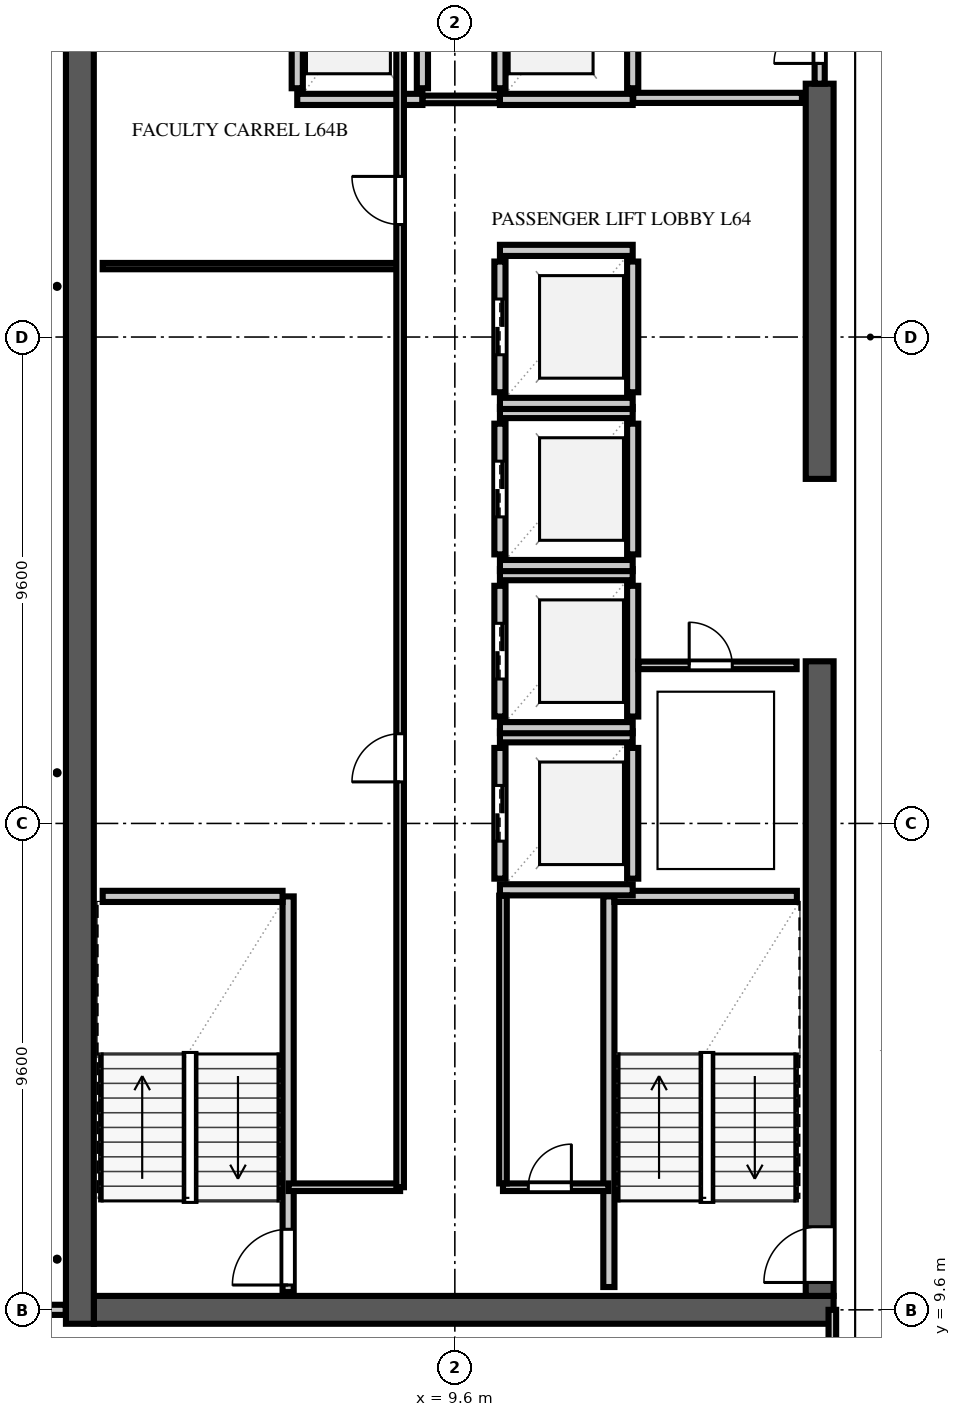
"""IFC4 building model, lengths in metres.
Left out: names, types, materials, properties, quantities, classifications, styles, units other than length and angle.
Written with IfcOpenShell. Run it as: python <this file> out.ifc"""

import sys

from ifc_helpers import new_model, si_unit, direction, frame, frame_2d, origin, place, context, subcontext, project, spatial, rectangle, extrude, element, fill, save


model = new_model("IFC4")
c1 = context("Model", 3, precision=1e-05, world=origin(), true_north=direction((0.0, 1.0)))
c2 = subcontext(c1, "Body", "Model", "MODEL_VIEW")
j1 = project(units=[si_unit("LENGTHUNIT", "METRE"), si_unit("PLANEANGLEUNIT", "RADIAN")], contexts=[c1])
p1 = place(None, origin())
s1 = spatial("IfcSite", under=j1, at=p1, CompositionType="ELEMENT")
p2 = place(p1, origin())
s2 = spatial("IfcBuilding", under=s1, at=p2, CompositionType="ELEMENT")
p3 = place(p2, frame((0.0, 0.0, 252.2)))
s3 = spatial("IfcBuildingStorey", under=s2, at=p3, CompositionType="ELEMENT", Elevation=252.2)
p4 = place(p3, frame((2.475, 9.6, 0.0), z_axis=(0.0, 0.0, 1.0), x_axis=(1.0, 0.0, 0.0)))
e1 = element("IfcWall", 1, at=p4, inside=s3, PredefinedType="SHEAR", context=c2, shape_type="SweptSolid", body=[
    extrude(rectangle(XDim=14.6, YDim=0.55, at=frame_2d((7.3, 0.0))), origin(), (0.0, 0.0, 1.0), 3.48),
])
p5 = place(p3, frame((2.2, 9.325, 0.0), z_axis=(0.0, 0.0, 1.0), x_axis=(0.0, 1.0, 0.0)))
e2 = element("IfcWall", 2, at=p5, inside=s3, PredefinedType="SHEAR", context=c2, shape_type="SweptSolid", body=[
    extrude(rectangle(XDim=38.95, YDim=0.55, at=frame_2d((19.475, 0.0))), origin(), (0.0, 0.0, 1.0), 3.48),
])
p6 = place(p3, frame((16.8, 9.875, 0.0), z_axis=(0.0, 0.0, 1.0), x_axis=(0.0, 1.0, 0.0)))
e3 = element("IfcWall", 3, at=p6, inside=s3, PredefinedType="SHEAR", context=c2, shape_type="SweptSolid", body=[
    extrude(rectangle(XDim=12.525, YDim=0.55, at=frame_2d((6.262, 0.0))), origin(), (0.0, 0.0, 1.0), 3.48),
])
p7 = place(p6, frame((0.265, 0.0, 0.0)))
e4 = element("IfcOpeningElement", 4, at=p7, cuts=e3, PredefinedType="OPENING", context=c2, shape_type="SweptSolid", body=[
    extrude(rectangle(XDim=1.1, YDim=2.2, at=frame_2d((0.55, 1.1))), frame((0.0, 0.287, 0.0), z_axis=(0.0, -1.0, 0.0), x_axis=(1.0, 0.0, 0.0)), (0.0, 0.0, 1.0), 0.574),
])
p8 = place(p3, frame((16.8, 26.0, 0.0), z_axis=(0.0, 0.0, 1.0), x_axis=(0.0, 1.0, 0.0)))
e5 = element("IfcWall", 5, at=p8, inside=s3, PredefinedType="SHEAR", context=c2, shape_type="SweptSolid", body=[
    extrude(rectangle(XDim=7.8, YDim=0.55, at=frame_2d((3.9, 0.0))), origin(), (0.0, 0.0, 1.0), 3.48),
])
p9 = place(p3, frame((6.31, 9.95, 0.0), z_axis=(0.0, 0.0, 1.0), x_axis=(0.0, 1.0, 0.0)))
e6 = element("IfcWall", 6, at=p9, inside=s3, PredefinedType="SOLIDWALL", context=c2, shape_type="SweptSolid", body=[
    extrude(rectangle(XDim=7.81, YDim=0.22, at=frame_2d((3.905, 0.0))), origin(), (0.0, 0.0, 1.0), 3.48),
])
p10 = place(p9, frame((0.14, 0.0, 0.0)))
e7 = element("IfcOpeningElement", 7, at=p10, cuts=e6, PredefinedType="OPENING", context=c2, shape_type="SweptSolid", body=[
    extrude(rectangle(XDim=1.1, YDim=2.2, at=frame_2d((0.55, 1.1))), frame((0.0, 0.122, 0.0), z_axis=(0.0, -1.0, 0.0), x_axis=(1.0, 0.0, 0.0)), (0.0, 0.0, 1.0), 0.244),
])
p11 = place(p3, frame((2.65, 17.76, 0.0), z_axis=(0.0, 0.0, 1.0), x_axis=(1.0, 0.0, 0.0)))
e8 = element("IfcWall", 8, at=p11, inside=s3, PredefinedType="SOLIDWALL", context=c2, shape_type="SweptSolid", body=[
    extrude(rectangle(XDim=3.55, YDim=0.22, at=frame_2d((1.775, 0.0))), origin(), (0.0, 0.0, 1.0), 3.48),
])
p12 = place(p3, frame((12.64, 10.05, 0.0), z_axis=(0.0, 0.0, 1.0), x_axis=(0.0, 1.0, 0.0)))
e9 = element("IfcWall", 9, at=p12, inside=s3, PredefinedType="SOLIDWALL", context=c2, shape_type="SweptSolid", body=[
    extrude(rectangle(XDim=7.71, YDim=0.22, at=frame_2d((3.855, 0.0))), origin(), (0.0, 0.0, 1.0), 3.48),
])
p13 = place(p3, frame((12.75, 17.76, 0.0), z_axis=(0.0, 0.0, 1.0), x_axis=(1.0, 0.0, 0.0)))
e10 = element("IfcWall", 10, at=p13, inside=s3, PredefinedType="SOLIDWALL", context=c2, shape_type="SweptSolid", body=[
    extrude(rectangle(XDim=3.6, YDim=0.22, at=frame_2d((1.8, 0.0))), origin(), (0.0, 0.0, 1.0), 3.48),
])
p14 = place(p3, frame((10.49, 18.11, 0.0), z_axis=(0.0, 0.0, 1.0), x_axis=(0.0, 1.0, 0.0)))
e11 = element("IfcWall", 11, at=p14, inside=s3, PredefinedType="SOLIDWALL", context=c2, shape_type="SweptSolid", body=[
    extrude(rectangle(XDim=2.58, YDim=0.22, at=frame_2d((1.29, 0.0))), origin(), (0.0, 0.0, 1.0), 3.48),
])
p15 = place(p14, frame((0.74, 0.0, 0.0)))
e12 = element("IfcOpeningElement", 12, at=p15, cuts=e11, PredefinedType="OPENING", context=c2, shape_type="SweptSolid", body=[
    extrude(rectangle(XDim=1.1, YDim=2.2, at=frame_2d((0.55, 1.1))), frame((0.0, 0.122, 0.0), z_axis=(0.0, -1.0, 0.0), x_axis=(1.0, 0.0, 0.0)), (0.0, 0.0, 1.0), 0.244),
])
p16 = place(p3, frame((13.11, 18.11, 0.0), z_axis=(0.0, 0.0, 1.0), x_axis=(0.0, 1.0, 0.0)))
e13 = element("IfcWall", 13, at=p16, inside=s3, PredefinedType="SOLIDWALL", context=c2, shape_type="SweptSolid", body=[
    extrude(rectangle(XDim=2.58, YDim=0.22, at=frame_2d((1.29, 0.0))), origin(), (0.0, 0.0, 1.0), 3.48),
])
for number, where, z_axis, x_axis in (
    (14, (10.49, 17.89, 0.0), (0.0, 0.0, 1.0), (1.0, 0.0, 0.0)),
    (15, (10.49, 20.91, 0.0), (0.0, 0.0, 1.0), (1.0, 0.0, 0.0)),
):
    element("IfcWall", number, at=place(p3, frame(where, z_axis=z_axis, x_axis=x_axis)), inside=s3, PredefinedType="SOLIDWALL", context=c2, shape_type="SweptSolid", body=[
        extrude(rectangle(XDim=2.62, YDim=0.22, at=frame_2d((1.31, 0.0))), origin(), (0.0, 0.0, 1.0), 3.48),
    ])
p17 = place(p3, frame((10.49, 21.31, 0.0), z_axis=(0.0, 0.0, 1.0), x_axis=(0.0, 1.0, 0.0)))
e16 = element("IfcWall", 16, at=p17, inside=s3, PredefinedType="SOLIDWALL", context=c2, shape_type="SweptSolid", body=[
    extrude(rectangle(XDim=2.58, YDim=0.22, at=frame_2d((1.29, 0.0))), origin(), (0.0, 0.0, 1.0), 3.48),
])
p18 = place(p17, frame((0.74, 0.0, 0.0)))
e17 = element("IfcOpeningElement", 17, at=p18, cuts=e16, PredefinedType="OPENING", context=c2, shape_type="SweptSolid", body=[
    extrude(rectangle(XDim=1.1, YDim=2.2, at=frame_2d((0.55, 1.1))), frame((0.0, 0.122, 0.0), z_axis=(0.0, -1.0, 0.0), x_axis=(1.0, 0.0, 0.0)), (0.0, 0.0, 1.0), 0.244),
])
p19 = place(p3, frame((13.11, 21.31, 0.0), z_axis=(0.0, 0.0, 1.0), x_axis=(0.0, 1.0, 0.0)))
e18 = element("IfcWall", 18, at=p19, inside=s3, PredefinedType="SOLIDWALL", context=c2, shape_type="SweptSolid", body=[
    extrude(rectangle(XDim=2.58, YDim=0.22, at=frame_2d((1.29, 0.0))), origin(), (0.0, 0.0, 1.0), 3.48),
])
for number, where, z_axis, x_axis in (
    (19, (10.49, 21.09, 0.0), (0.0, 0.0, 1.0), (1.0, 0.0, 0.0)),
    (20, (10.49, 24.11, 0.0), (0.0, 0.0, 1.0), (1.0, 0.0, 0.0)),
):
    element("IfcWall", number, at=place(p3, frame(where, z_axis=z_axis, x_axis=x_axis)), inside=s3, PredefinedType="SOLIDWALL", context=c2, shape_type="SweptSolid", body=[
        extrude(rectangle(XDim=2.62, YDim=0.22, at=frame_2d((1.31, 0.0))), origin(), (0.0, 0.0, 1.0), 3.48),
    ])
p20 = place(p3, frame((10.49, 24.51, 0.0), z_axis=(0.0, 0.0, 1.0), x_axis=(0.0, 1.0, 0.0)))
e21 = element("IfcWall", 21, at=p20, inside=s3, PredefinedType="SOLIDWALL", context=c2, shape_type="SweptSolid", body=[
    extrude(rectangle(XDim=2.58, YDim=0.22, at=frame_2d((1.29, 0.0))), origin(), (0.0, 0.0, 1.0), 3.48),
])
p21 = place(p20, frame((0.74, 0.0, 0.0)))
e22 = element("IfcOpeningElement", 22, at=p21, cuts=e21, PredefinedType="OPENING", context=c2, shape_type="SweptSolid", body=[
    extrude(rectangle(XDim=1.1, YDim=2.2, at=frame_2d((0.55, 1.1))), frame((0.0, 0.122, 0.0), z_axis=(0.0, -1.0, 0.0), x_axis=(1.0, 0.0, 0.0)), (0.0, 0.0, 1.0), 0.244),
])
p22 = place(p3, frame((13.11, 24.51, 0.0), z_axis=(0.0, 0.0, 1.0), x_axis=(0.0, 1.0, 0.0)))
e23 = element("IfcWall", 23, at=p22, inside=s3, PredefinedType="SOLIDWALL", context=c2, shape_type="SweptSolid", body=[
    extrude(rectangle(XDim=2.58, YDim=0.22, at=frame_2d((1.29, 0.0))), origin(), (0.0, 0.0, 1.0), 3.48),
])
for number, where, z_axis, x_axis in (
    (24, (10.49, 24.29, 0.0), (0.0, 0.0, 1.0), (1.0, 0.0, 0.0)),
    (25, (10.49, 27.31, 0.0), (0.0, 0.0, 1.0), (1.0, 0.0, 0.0)),
):
    element("IfcWall", number, at=place(p3, frame(where, z_axis=z_axis, x_axis=x_axis)), inside=s3, PredefinedType="SOLIDWALL", context=c2, shape_type="SweptSolid", body=[
        extrude(rectangle(XDim=2.62, YDim=0.22, at=frame_2d((1.31, 0.0))), origin(), (0.0, 0.0, 1.0), 3.48),
    ])
p23 = place(p3, frame((10.49, 27.71, 0.0), z_axis=(0.0, 0.0, 1.0), x_axis=(0.0, 1.0, 0.0)))
e26 = element("IfcWall", 26, at=p23, inside=s3, PredefinedType="SOLIDWALL", context=c2, shape_type="SweptSolid", body=[
    extrude(rectangle(XDim=2.58, YDim=0.22, at=frame_2d((1.29, 0.0))), origin(), (0.0, 0.0, 1.0), 3.48),
])
p24 = place(p23, frame((0.74, 0.0, 0.0)))
e27 = element("IfcOpeningElement", 27, at=p24, cuts=e26, PredefinedType="OPENING", context=c2, shape_type="SweptSolid", body=[
    extrude(rectangle(XDim=1.1, YDim=2.2, at=frame_2d((0.55, 1.1))), frame((0.0, 0.122, 0.0), z_axis=(0.0, -1.0, 0.0), x_axis=(1.0, 0.0, 0.0)), (0.0, 0.0, 1.0), 0.244),
])
p25 = place(p3, frame((13.11, 27.71, 0.0), z_axis=(0.0, 0.0, 1.0), x_axis=(0.0, 1.0, 0.0)))
e28 = element("IfcWall", 28, at=p25, inside=s3, PredefinedType="SOLIDWALL", context=c2, shape_type="SweptSolid", body=[
    extrude(rectangle(XDim=2.58, YDim=0.22, at=frame_2d((1.29, 0.0))), origin(), (0.0, 0.0, 1.0), 3.48),
])
for number, where, z_axis, x_axis in (
    (29, (10.49, 27.49, 0.0), (0.0, 0.0, 1.0), (1.0, 0.0, 0.0)),
    (30, (10.49, 30.51, 0.0), (0.0, 0.0, 1.0), (1.0, 0.0, 0.0)),
):
    element("IfcWall", number, at=place(p3, frame(where, z_axis=z_axis, x_axis=x_axis)), inside=s3, PredefinedType="SOLIDWALL", context=c2, shape_type="SweptSolid", body=[
        extrude(rectangle(XDim=2.62, YDim=0.22, at=frame_2d((1.31, 0.0))), origin(), (0.0, 0.0, 1.0), 3.48),
    ])
for number, where, z_axis, x_axis in (
    (31, (6.49, 33.71, 0.0), (0.0, 0.0, 1.0), (0.0, 1.0, 0.0)),
    (32, (8.96, 33.71, 0.0), (0.0, 0.0, 1.0), (0.0, 1.0, 0.0)),
):
    element("IfcWall", number, at=place(p3, frame(where, z_axis=z_axis, x_axis=x_axis)), inside=s3, PredefinedType="SOLIDWALL", context=c2, shape_type="SweptSolid", body=[
        extrude(rectangle(XDim=2.78, YDim=0.22, at=frame_2d((1.39, 0.0))), origin(), (0.0, 0.0, 1.0), 3.48),
    ])
p26 = place(p3, frame((6.49, 33.49, 0.0), z_axis=(0.0, 0.0, 1.0), x_axis=(1.0, 0.0, 0.0)))
e33 = element("IfcWall", 33, at=p26, inside=s3, PredefinedType="SOLIDWALL", context=c2, shape_type="SweptSolid", body=[
    extrude(rectangle(XDim=2.47, YDim=0.22, at=frame_2d((1.235, 0.0))), origin(), (0.0, 0.0, 1.0), 3.48),
])
for number, where, z_axis, x_axis in (
    (34, (10.49, 33.71, 0.0), (0.0, 0.0, 1.0), (0.0, 1.0, 0.0)),
    (35, (13.11, 33.71, 0.0), (0.0, 0.0, 1.0), (0.0, 1.0, 0.0)),
):
    element("IfcWall", number, at=place(p3, frame(where, z_axis=z_axis, x_axis=x_axis)), inside=s3, PredefinedType="SOLIDWALL", context=c2, shape_type="SweptSolid", body=[
        extrude(rectangle(XDim=2.78, YDim=0.22, at=frame_2d((1.39, 0.0))), origin(), (0.0, 0.0, 1.0), 3.48),
    ])
p27 = place(p3, frame((10.49, 33.49, 0.0), z_axis=(0.0, 0.0, 1.0), x_axis=(1.0, 0.0, 0.0)))
e36 = element("IfcWall", 36, at=p27, inside=s3, PredefinedType="SOLIDWALL", context=c2, shape_type="SweptSolid", body=[
    extrude(rectangle(XDim=2.62, YDim=0.22, at=frame_2d((1.31, 0.0))), origin(), (0.0, 0.0, 1.0), 3.48),
])
p28 = place(p3, frame((13.12, 33.52, 0.0), z_axis=(0.0, 0.0, 1.0), x_axis=(1.0, 0.0, 0.0)))
e37 = element("IfcWall", 37, at=p28, inside=s3, PredefinedType="SOLIDWALL", context=c2, shape_type="SweptSolid", body=[
    extrude(rectangle(XDim=3.33, YDim=0.2, at=frame_2d((1.665, 0.0))), origin(), (0.0, 0.0, 1.0), 3.48),
])
p29 = place(p3, frame((16.8, 33.8, 0.0), z_axis=(0.0, 0.0, 1.0), x_axis=(0.0, 1.0, 0.0)))
e38 = element("IfcWall", 38, at=p29, inside=s3, PredefinedType="SOLIDWALL", context=c2, shape_type="SweptSolid", body=[
    extrude(rectangle(XDim=2.6, YDim=0.2, at=frame_2d((1.3, 0.0))), origin(), (0.0, 0.0, 1.0), 3.48),
])
p30 = place(p29, frame((0.4, 0.0, 0.0)))
e39 = element("IfcOpeningElement", 39, at=p30, cuts=e38, PredefinedType="OPENING", context=c2, shape_type="SweptSolid", body=[
    extrude(rectangle(XDim=1.8, YDim=2.2, at=frame_2d((0.9, 1.1))), frame((0.0, 0.112, 0.0), z_axis=(0.0, -1.0, 0.0), x_axis=(1.0, 0.0, 0.0)), (0.0, 0.0, 1.0), 0.224),
])
p31 = place(p3, frame((8.965, 33.49, 0.0), z_axis=(0.0, 0.0, 1.0), x_axis=(1.0, 0.0, 0.0)))
e40 = element("IfcWall", 40, at=p31, inside=s3, PredefinedType="PARTITIONING", context=c2, shape_type="SweptSolid", body=[
    extrude(rectangle(XDim=1.52, YDim=0.15, at=frame_2d((0.76, 0.0))), origin(), (0.0, 0.0, 1.0), 3.48),
])
p32 = place(p3, frame((10.55, 12.02, 0.0), z_axis=(0.0, 0.0, 1.0), x_axis=(1.0, 0.0, 0.0)))
e41 = element("IfcWall", 41, at=p32, inside=s3, PredefinedType="PARTITIONING", context=c2, shape_type="SweptSolid", body=[
    extrude(rectangle(XDim=2.08, YDim=0.15, at=frame_2d((1.04, 0.0))), origin(), (0.0, 0.0, 1.0), 3.48),
])
p33 = place(p32, frame((0.5, 0.0, 0.0)))
e42 = element("IfcOpeningElement", 42, at=p33, cuts=e41, PredefinedType="OPENING", context=c2, shape_type="SweptSolid", body=[
    extrude(rectangle(XDim=0.85, YDim=2.1, at=frame_2d((0.425, 1.05))), frame((0.0, 0.087, 0.0), z_axis=(0.0, -1.0, 0.0), x_axis=(1.0, 0.0, 0.0)), (0.0, 0.0, 1.0), 0.174),
])
p34 = place(p3, frame((10.55, 12.095, 0.0), z_axis=(0.0, 0.0, 1.0), x_axis=(0.0, 1.0, 0.0)))
e43 = element("IfcWall", 43, at=p34, inside=s3, PredefinedType="PARTITIONING", context=c2, shape_type="SweptSolid", body=[
    extrude(rectangle(XDim=5.68, YDim=0.15, at=frame_2d((2.84, 0.0))), origin(), (0.0, 0.0, 1.0), 3.48),
])
p35 = place(p3, frame((13.225, 22.32, 0.0), z_axis=(0.0, 0.0, 1.0), x_axis=(1.0, 0.0, 0.0)))
e44 = element("IfcWall", 44, at=p35, inside=s3, PredefinedType="PARTITIONING", context=c2, shape_type="SweptSolid", body=[
    extrude(rectangle(XDim=3.12, YDim=0.15, at=frame_2d((1.56, 0.0))), origin(), (0.0, 0.0, 1.0), 3.48),
])
p36 = place(p35, frame((1.0, 0.0, 0.0)))
e45 = element("IfcOpeningElement", 45, at=p36, cuts=e44, PredefinedType="OPENING", context=c2, shape_type="SweptSolid", body=[
    extrude(rectangle(XDim=0.85, YDim=2.1, at=frame_2d((0.425, 1.05))), frame((0.0, 0.087, 0.0), z_axis=(0.0, -1.0, 0.0), x_axis=(1.0, 0.0, 0.0)), (0.0, 0.0, 1.0), 0.174),
])
p37 = place(p3, frame((6.32, 12.02, 0.0), z_axis=(0.0, 0.0, 1.0), x_axis=(1.0, 0.0, 0.0)))
e46 = element("IfcWall", 46, at=p37, inside=s3, PredefinedType="PARTITIONING", context=c2, shape_type="SweptSolid", body=[
    extrude(rectangle(XDim=2.2, YDim=0.15, at=frame_2d((1.1, 0.0))), origin(), (0.0, 0.0, 1.0), 3.48),
])
p38 = place(p3, frame((2.65, 30.2, 0.0), z_axis=(0.0, 0.0, 1.0), x_axis=(1.0, 0.0, 0.0)))
e47 = element("IfcWall", 47, at=p38, inside=s3, PredefinedType="PARTITIONING", context=c2, shape_type="SweptSolid", body=[
    extrude(rectangle(XDim=5.87, YDim=0.125, at=frame_2d((2.935, 0.0))), origin(), (0.0, 0.0, 1.0), 3.48),
])
p39 = place(p3, frame((8.52, 12.02, 0.0), z_axis=(0.0, 0.0, 1.0), x_axis=(0.0, 1.0, 0.0)))
e48 = element("IfcWall", 48, at=p39, inside=s3, PredefinedType="PARTITIONING", context=c2, shape_type="SweptSolid", body=[
    extrude(rectangle(XDim=24.76, YDim=0.15, at=frame_2d((12.38, 0.0))), origin(), (0.0, 0.0, 1.0), 3.48),
])
p40 = place(p39, frame((8.0, 0.0, 0.0)))
e49 = element("IfcOpeningElement", 49, at=p40, cuts=e48, PredefinedType="OPENING", context=c2, shape_type="SweptSolid", body=[
    extrude(rectangle(XDim=0.95, YDim=2.15, at=frame_2d((0.475, 1.075))), frame((0.0, 0.087, 0.0), z_axis=(0.0, -1.0, 0.0), x_axis=(1.0, 0.0, 0.0)), (0.0, 0.0, 1.0), 0.174),
])
p41 = place(p39, frame((19.0, 0.0, 0.0)))
e50 = element("IfcOpeningElement", 50, at=p41, cuts=e48, PredefinedType="OPENING", context=c2, shape_type="SweptSolid", body=[
    extrude(rectangle(XDim=0.95, YDim=2.15, at=frame_2d((0.475, 1.075))), frame((0.0, 0.087, 0.0), z_axis=(0.0, -1.0, 0.0), x_axis=(1.0, 0.0, 0.0)), (0.0, 0.0, 1.0), 0.174),
])
p42 = place(p3, frame((0.85, 9.6, 0.0), z_axis=(0.0, 0.0, 1.0), x_axis=(1.0, 0.0, 0.0)))
e51 = element("IfcWall", 51, at=p42, inside=s3, PredefinedType="SOLIDWALL", context=c2, shape_type="SweptSolid", body=[
    extrude(rectangle(XDim=1.07, YDim=0.2, at=frame_2d((0.535, 0.0))), origin(), (0.0, 0.0, 1.0), 2.863),
])
p43 = place(p3, frame((17.05, 0.22, 0.0), z_axis=(0.0, 0.0, 1.0), x_axis=(0.0, 1.0, 0.0)))
e52 = element("IfcWall", 52, at=p43, inside=s3, PredefinedType="PARTITIONING", context=c2, shape_type="SweptSolid", body=[
    extrude(rectangle(XDim=9.38, YDim=0.15, at=frame_2d((4.69, 0.0))), origin(), (0.0, 0.0, 1.0), 3.48),
])
p44 = place(p43, frame((5.58, 0.0, 0.0)))
e53 = element("IfcOpeningElement", 53, at=p44, cuts=e52, PredefinedType="OPENING", context=c2, shape_type="SweptSolid", body=[
    extrude(rectangle(XDim=0.95, YDim=2.15, at=frame_2d((0.475, 1.075))), frame((0.0, 0.087, 0.0), z_axis=(0.0, -1.0, 0.0), x_axis=(1.0, 0.0, 0.0)), (0.0, 0.0, 1.0), 0.174),
])
p45 = place(p10, origin())
e54 = element("IfcDoor", 54, at=p45, inside=s3, OperationType="SINGLE_SWING_LEFT", PredefinedType="DOOR", context=c2, shape_type="SweptSolid", body=[
    extrude(rectangle(XDim=1.1, YDim=2.2, at=frame_2d((0.55, 1.1))), frame((0.0, 0.025, 0.0), z_axis=(0.0, -1.0, 0.0), x_axis=(1.0, 0.0, 0.0)), (0.0, 0.0, 1.0), 0.05),
])
fill(e7, e54)
p46 = place(p7, origin())
e55 = element("IfcDoor", 55, at=p46, inside=s3, OperationType="SINGLE_SWING_LEFT", PredefinedType="DOOR", context=c2, shape_type="SweptSolid", body=[
    extrude(rectangle(XDim=1.1, YDim=2.2, at=frame_2d((0.55, 1.1))), frame((0.0, 0.025, 0.0), z_axis=(0.0, -1.0, 0.0), x_axis=(1.0, 0.0, 0.0)), (0.0, 0.0, 1.0), 0.05),
])
fill(e4, e55)
p47 = place(p15, origin())
e56 = element("IfcDoor", 56, at=p47, inside=s3, OperationType="DOUBLE_DOOR_SLIDING", PredefinedType="DOOR", context=c2, shape_type="SweptSolid", body=[
    extrude(rectangle(XDim=1.1, YDim=2.2, at=frame_2d((0.55, 1.1))), frame((0.0, 0.025, 0.0), z_axis=(0.0, -1.0, 0.0), x_axis=(1.0, 0.0, 0.0)), (0.0, 0.0, 1.0), 0.05),
])
fill(e12, e56)
p48 = place(p18, origin())
e57 = element("IfcDoor", 57, at=p48, inside=s3, OperationType="DOUBLE_DOOR_SLIDING", PredefinedType="DOOR", context=c2, shape_type="SweptSolid", body=[
    extrude(rectangle(XDim=1.1, YDim=2.2, at=frame_2d((0.55, 1.1))), frame((0.0, 0.025, 0.0), z_axis=(0.0, -1.0, 0.0), x_axis=(1.0, 0.0, 0.0)), (0.0, 0.0, 1.0), 0.05),
])
fill(e17, e57)
p49 = place(p21, origin())
e58 = element("IfcDoor", 58, at=p49, inside=s3, OperationType="DOUBLE_DOOR_SLIDING", PredefinedType="DOOR", context=c2, shape_type="SweptSolid", body=[
    extrude(rectangle(XDim=1.1, YDim=2.2, at=frame_2d((0.55, 1.1))), frame((0.0, 0.025, 0.0), z_axis=(0.0, -1.0, 0.0), x_axis=(1.0, 0.0, 0.0)), (0.0, 0.0, 1.0), 0.05),
])
fill(e22, e58)
p50 = place(p24, origin())
e59 = element("IfcDoor", 59, at=p50, inside=s3, OperationType="DOUBLE_DOOR_SLIDING", PredefinedType="DOOR", context=c2, shape_type="SweptSolid", body=[
    extrude(rectangle(XDim=1.1, YDim=2.2, at=frame_2d((0.55, 1.1))), frame((0.0, 0.025, 0.0), z_axis=(0.0, -1.0, 0.0), x_axis=(1.0, 0.0, 0.0)), (0.0, 0.0, 1.0), 0.05),
])
fill(e27, e59)
p51 = place(p30, origin())
e60 = element("IfcDoor", 60, at=p51, inside=s3, OperationType="DOUBLE_DOOR_SINGLE_SWING", PredefinedType="DOOR", context=c2, shape_type="SweptSolid", body=[
    extrude(rectangle(XDim=1.8, YDim=2.2, at=frame_2d((0.9, 1.1))), frame((0.0, 0.025, 0.0), z_axis=(0.0, -1.0, 0.0), x_axis=(1.0, 0.0, 0.0)), (0.0, 0.0, 1.0), 0.05),
])
fill(e39, e60)
p52 = place(p33, origin())
e61 = element("IfcDoor", 61, at=p52, inside=s3, OperationType="SINGLE_SWING_RIGHT", PredefinedType="DOOR", context=c2, shape_type="SweptSolid", body=[
    extrude(rectangle(XDim=0.85, YDim=2.1, at=frame_2d((0.425, 1.05))), frame((0.0, 0.025, 0.0), z_axis=(0.0, -1.0, 0.0), x_axis=(1.0, 0.0, 0.0)), (0.0, 0.0, 1.0), 0.05),
])
fill(e42, e61)
p53 = place(p36, origin())
e62 = element("IfcDoor", 62, at=p53, inside=s3, OperationType="SINGLE_SWING_LEFT", PredefinedType="DOOR", context=c2, shape_type="SweptSolid", body=[
    extrude(rectangle(XDim=0.85, YDim=2.1, at=frame_2d((0.425, 1.05))), frame((0.0, 0.025, 0.0), z_axis=(0.0, -1.0, 0.0), x_axis=(1.0, 0.0, 0.0)), (0.0, 0.0, 1.0), 0.05),
])
fill(e45, e62)
p54 = place(p40, origin())
e63 = element("IfcDoor", 63, at=p54, inside=s3, OperationType="SINGLE_SWING_LEFT", PredefinedType="DOOR", context=c2, shape_type="SweptSolid", body=[
    extrude(rectangle(XDim=0.95, YDim=2.15, at=frame_2d((0.475, 1.075))), frame((0.0, 0.025, 0.0), z_axis=(0.0, -1.0, 0.0), x_axis=(1.0, 0.0, 0.0)), (0.0, 0.0, 1.0), 0.05),
])
fill(e49, e63)
p55 = place(p41, origin())
e64 = element("IfcDoor", 64, at=p55, inside=s3, OperationType="SINGLE_SWING_RIGHT", PredefinedType="DOOR", context=c2, shape_type="SweptSolid", body=[
    extrude(rectangle(XDim=0.95, YDim=2.15, at=frame_2d((0.475, 1.075))), frame((0.0, 0.025, 0.0), z_axis=(0.0, -1.0, 0.0), x_axis=(1.0, 0.0, 0.0)), (0.0, 0.0, 1.0), 0.05),
])
fill(e50, e64)
save(model, sys.argv[1])
